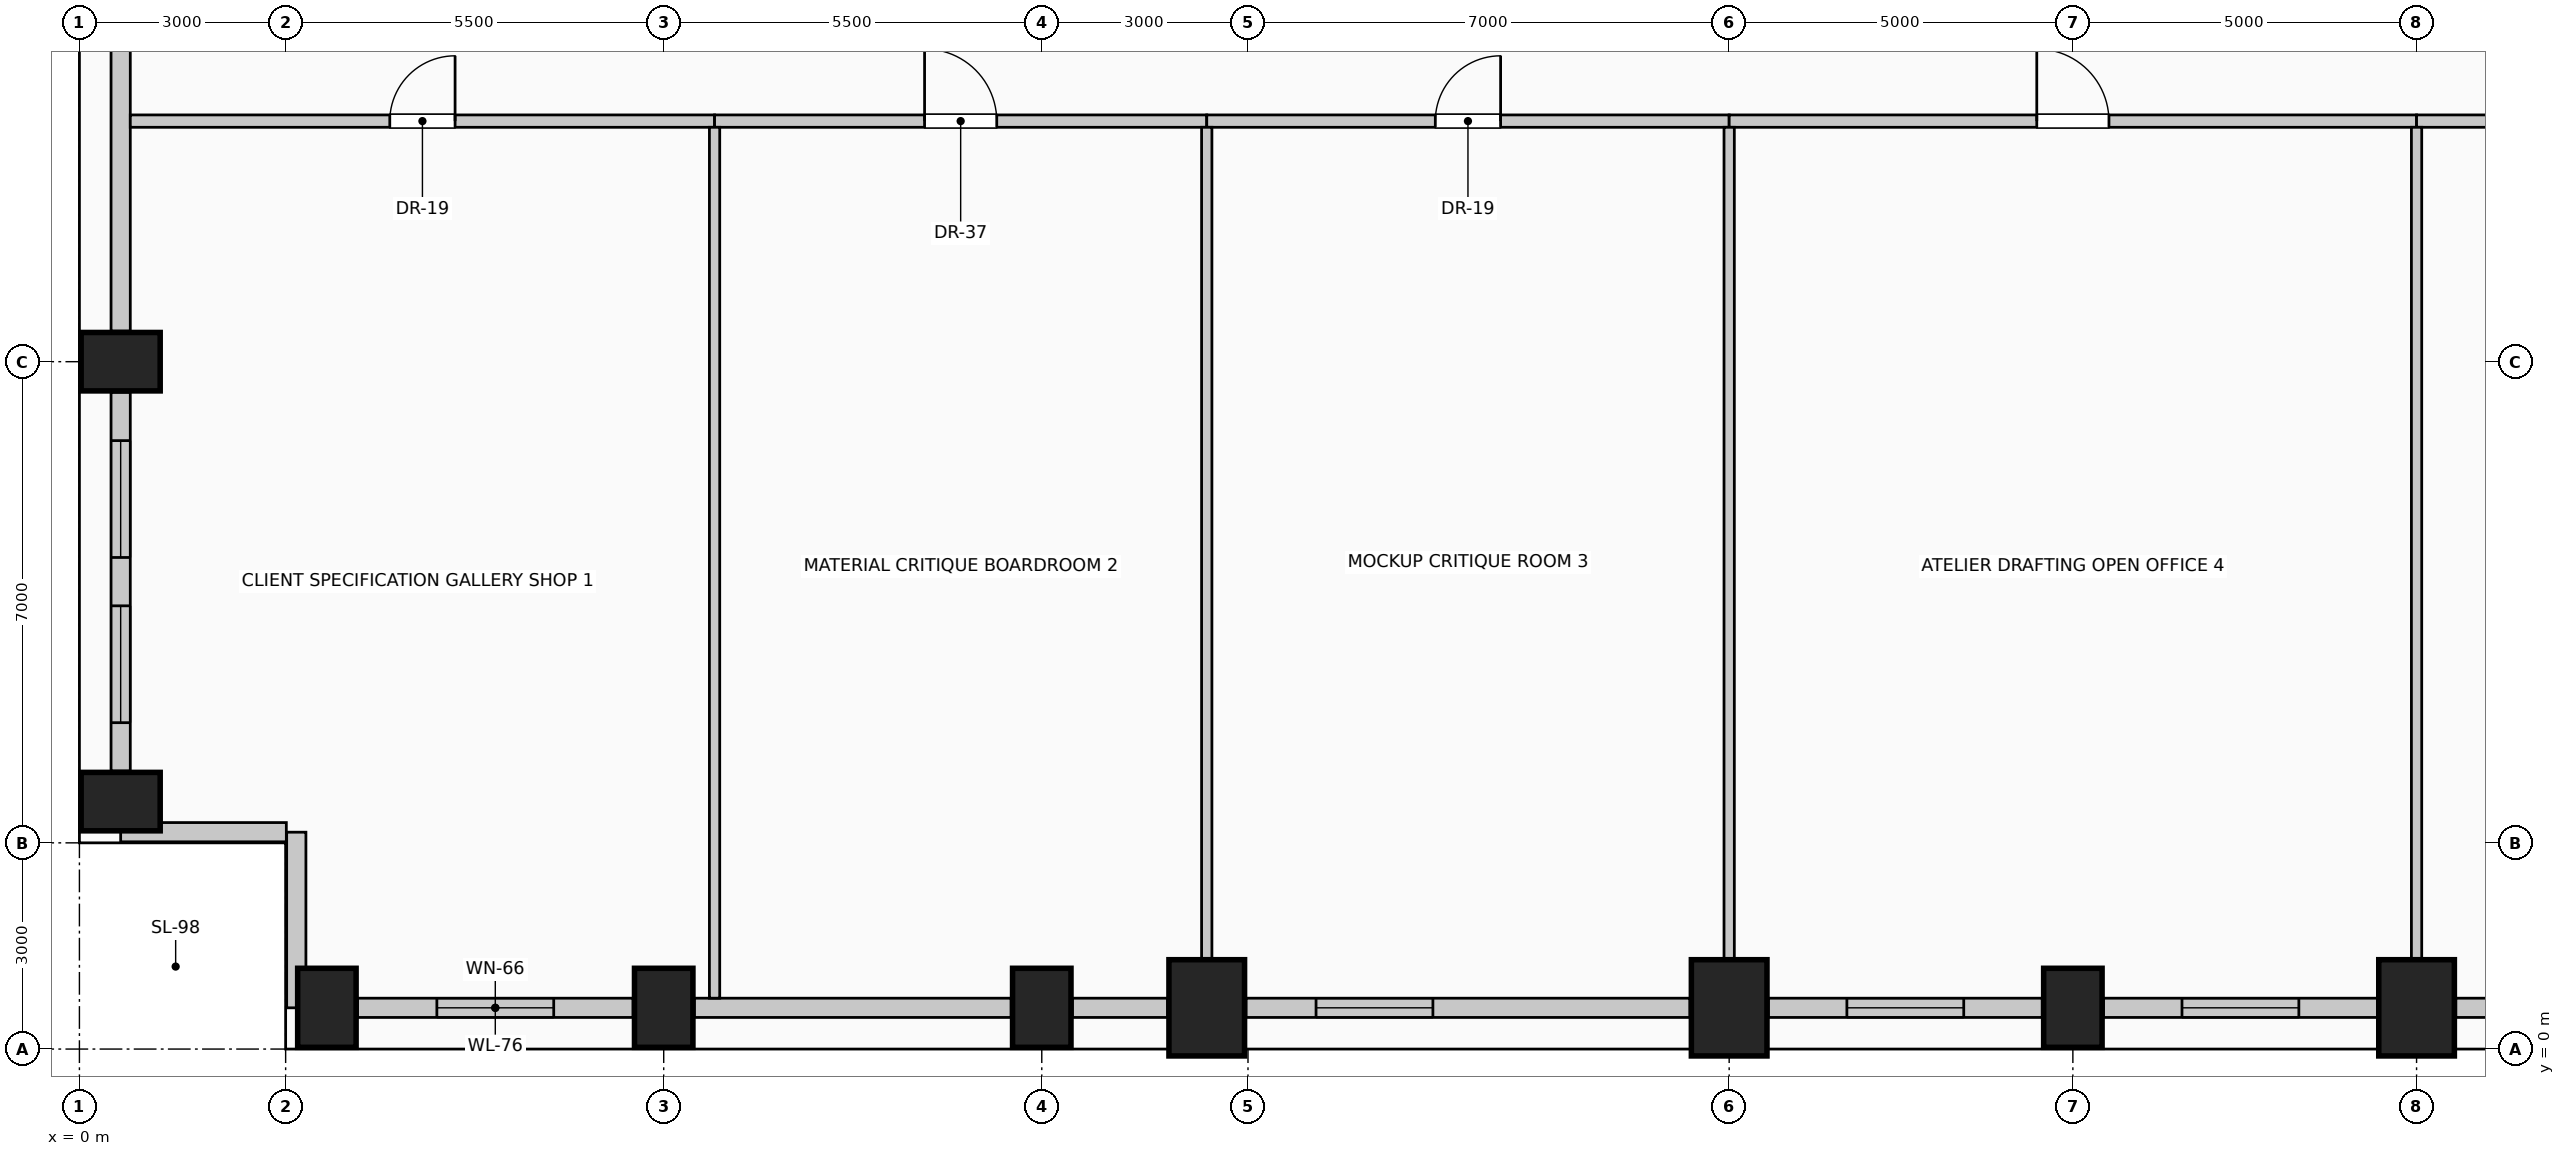
"""IFC4 building model, lengths in metres.
Left out: names, types, materials, properties, quantities, classifications, styles, units other than length and angle.
Written with IfcOpenShell. Run it as: python <this file> out.ifc"""

import sys

from ifc_helpers import new_model, si_unit, direction, frame, frame_2d, origin, origin_2d, place, context, subcontext, project, spatial, rectangle, extrude, element, fill, save


model = new_model("IFC4")
c1 = context("Model", 3, precision=1e-05, world=origin(), true_north=direction((0.0, 1.0)))
c2 = subcontext(c1, "Body", "Model", "MODEL_VIEW")
j1 = project(units=[si_unit("LENGTHUNIT", "METRE"), si_unit("PLANEANGLEUNIT", "RADIAN")], contexts=[c1])
p1 = place(None, origin())
s1 = spatial("IfcSite", under=j1, at=p1, CompositionType="ELEMENT")
p2 = place(p1, origin())
s2 = spatial("IfcBuilding", under=s1, at=p2, CompositionType="ELEMENT")
p3 = place(p2, frame((0.0, 0.0, 136.6)))
s3 = spatial("IfcBuildingStorey", under=s2, at=p3, CompositionType="ELEMENT", Elevation=136.6)
for number, where, z_axis, x_axis in (
    (1, (3.6, 0.6, 0.0), (0.0, 0.0, 1.0), (1.0, 0.0, 0.0)),
    (2, (8.5, 0.6, 0.0), (0.0, 0.0, 1.0), (1.0, 0.0, 0.0)),
    (3, (14.0, 0.6, 0.0), (0.0, 0.0, 1.0), (1.0, 0.0, 0.0)),
):
    element("IfcColumn", number, at=place(p3, frame(where, z_axis=z_axis, x_axis=x_axis)), inside=s3, PredefinedType="COLUMN", context=c2, shape_type="SweptSolid", body=[
        extrude(rectangle(XDim=0.85, YDim=1.15, at=origin_2d()), origin(), (0.0, 0.0, 1.0), 4.0),
    ])
for number, where, z_axis, x_axis in (
    (4, (16.4, 0.6, 0.0), (0.0, 0.0, 1.0), (1.0, 0.0, 0.0)),
    (5, (24.0, 0.6, 0.0), (0.0, 0.0, 1.0), (1.0, 0.0, 0.0)),
):
    element("IfcColumn", number, at=place(p3, frame(where, z_axis=z_axis, x_axis=x_axis)), inside=s3, PredefinedType="COLUMN", context=c2, shape_type="SweptSolid", body=[
        extrude(rectangle(XDim=1.1, YDim=1.4, at=origin_2d()), origin(), (0.0, 0.0, 1.0), 4.0),
    ])
p4 = place(p3, frame((29.0, 0.6, 0.0), z_axis=(0.0, 0.0, 1.0), x_axis=(1.0, 0.0, 0.0)))
e6 = element("IfcColumn", 6, at=p4, inside=s3, PredefinedType="COLUMN", context=c2, shape_type="SweptSolid", body=[
    extrude(rectangle(XDim=0.85, YDim=1.15, at=origin_2d()), origin(), (0.0, 0.0, 1.0), 4.0),
])
p5 = place(p3, frame((34.0, 0.6, 0.0), z_axis=(0.0, 0.0, 1.0), x_axis=(1.0, 0.0, 0.0)))
e7 = element("IfcColumn", 7, at=p5, inside=s3, PredefinedType="COLUMN", context=c2, shape_type="SweptSolid", body=[
    extrude(rectangle(XDim=1.1, YDim=1.4, at=origin_2d()), origin(), (0.0, 0.0, 1.0), 4.0),
])
for number, where, z_axis, x_axis in (
    (8, (0.6, 3.6, 0.0), (0.0, 0.0, 1.0), (0.0, 1.0, 0.0)),
    (9, (0.6, 10.0, 0.0), (0.0, 0.0, 1.0), (0.0, 1.0, 0.0)),
):
    element("IfcColumn", number, at=place(p3, frame(where, z_axis=z_axis, x_axis=x_axis)), inside=s3, PredefinedType="COLUMN", context=c2, shape_type="SweptSolid", body=[
        extrude(rectangle(XDim=0.85, YDim=1.15, at=origin_2d()), origin(), (0.0, 0.0, 1.0), 4.0),
    ])
p6 = place(p3, frame((8.055, 0.6, 0.0), z_axis=(0.0, 0.0, 1.0), x_axis=(-1.0, 0.0, 0.0)))
e10 = element("IfcWall", 10, at=p6, inside=s3, PredefinedType="SOLIDWALL", context=c2, shape_type="SweptSolid", body=[
    extrude(rectangle(XDim=4.01, YDim=0.28, at=frame_2d((2.005, 0.0))), origin(), (0.0, 0.0, 1.0), 2.875),
])
p7 = place(p6, frame((1.155, 0.0, 0.5)))
e11 = element("IfcOpeningElement", 11, at=p7, cuts=e10, PredefinedType="OPENING", context=c2, shape_type="SweptSolid", body=[
    extrude(rectangle(XDim=1.7, YDim=1.95, at=frame_2d((0.85, 0.975))), frame((0.0, 0.15, 0.0), z_axis=(0.0, -1.0, 0.0), x_axis=(1.0, 0.0, 0.0)), (0.0, 0.0, 1.0), 0.3),
])
p8 = place(p3, frame((13.555, 0.6, 0.0), z_axis=(0.0, 0.0, 1.0), x_axis=(-1.0, 0.0, 0.0)))
e12 = element("IfcWall", 12, at=p8, inside=s3, PredefinedType="SOLIDWALL", context=c2, shape_type="SweptSolid", body=[
    extrude(rectangle(XDim=4.61, YDim=0.28, at=frame_2d((2.305, 0.0))), origin(), (0.0, 0.0, 1.0), 2.875),
])
p9 = place(p3, frame((15.83, 0.6, 0.0), z_axis=(0.0, 0.0, 1.0), x_axis=(-1.0, 0.0, 0.0)))
e13 = element("IfcWall", 13, at=p9, inside=s3, PredefinedType="SOLIDWALL", context=c2, shape_type="SweptSolid", body=[
    extrude(rectangle(XDim=1.385, YDim=0.28, at=frame_2d((0.692, 0.0))), origin(), (0.0, 0.0, 1.0), 2.875),
])
p10 = place(p3, frame((23.43, 0.6, 0.0), z_axis=(0.0, 0.0, 1.0), x_axis=(-1.0, 0.0, 0.0)))
e14 = element("IfcWall", 14, at=p10, inside=s3, PredefinedType="SOLIDWALL", context=c2, shape_type="SweptSolid", body=[
    extrude(rectangle(XDim=6.46, YDim=0.28, at=frame_2d((3.23, 0.0))), origin(), (0.0, 0.0, 1.0), 2.875),
])
p11 = place(p10, frame((3.74, 0.0, 0.5)))
e15 = element("IfcOpeningElement", 15, at=p11, cuts=e14, PredefinedType="OPENING", context=c2, shape_type="SweptSolid", body=[
    extrude(rectangle(XDim=1.7, YDim=1.95, at=frame_2d((0.85, 0.975))), frame((0.0, 0.15, 0.0), z_axis=(0.0, -1.0, 0.0), x_axis=(1.0, 0.0, 0.0)), (0.0, 0.0, 1.0), 0.3),
])
p12 = place(p3, frame((28.555, 0.6, 0.0), z_axis=(0.0, 0.0, 1.0), x_axis=(-1.0, 0.0, 0.0)))
e16 = element("IfcWall", 16, at=p12, inside=s3, PredefinedType="SOLIDWALL", context=c2, shape_type="SweptSolid", body=[
    extrude(rectangle(XDim=3.985, YDim=0.28, at=frame_2d((1.992, 0.0))), origin(), (0.0, 0.0, 1.0), 2.875),
])
p13 = place(p12, frame((1.143, 0.0, 0.5)))
e17 = element("IfcOpeningElement", 17, at=p13, cuts=e16, PredefinedType="OPENING", context=c2, shape_type="SweptSolid", body=[
    extrude(rectangle(XDim=1.7, YDim=1.95, at=frame_2d((0.85, 0.975))), frame((0.0, 0.15, 0.0), z_axis=(0.0, -1.0, 0.0), x_axis=(1.0, 0.0, 0.0)), (0.0, 0.0, 1.0), 0.3),
])
p14 = place(p3, frame((33.43, 0.6, 0.0), z_axis=(0.0, 0.0, 1.0), x_axis=(-1.0, 0.0, 0.0)))
e18 = element("IfcWall", 18, at=p14, inside=s3, PredefinedType="SOLIDWALL", context=c2, shape_type="SweptSolid", body=[
    extrude(rectangle(XDim=3.985, YDim=0.28, at=frame_2d((1.992, 0.0))), origin(), (0.0, 0.0, 1.0), 2.875),
])
p15 = place(p14, frame((1.143, 0.0, 0.5)))
e19 = element("IfcOpeningElement", 19, at=p15, cuts=e18, PredefinedType="OPENING", context=c2, shape_type="SweptSolid", body=[
    extrude(rectangle(XDim=1.7, YDim=1.95, at=frame_2d((0.85, 0.975))), frame((0.0, 0.15, 0.0), z_axis=(0.0, -1.0, 0.0), x_axis=(1.0, 0.0, 0.0)), (0.0, 0.0, 1.0), 0.3),
])
p16 = place(p3, frame((41.03, 0.6, 0.0), z_axis=(0.0, 0.0, 1.0), x_axis=(-1.0, 0.0, 0.0)))
e20 = element("IfcWall", 20, at=p16, inside=s3, PredefinedType="SOLIDWALL", context=c2, shape_type="SweptSolid", body=[
    extrude(rectangle(XDim=6.46, YDim=0.28, at=frame_2d((3.23, 0.0))), origin(), (0.0, 0.0, 1.0), 2.875),
])
p17 = place(p16, frame((1.02, 0.0, 0.5)))
e21 = element("IfcOpeningElement", 21, at=p17, cuts=e20, PredefinedType="OPENING", context=c2, shape_type="SweptSolid", body=[
    extrude(rectangle(XDim=1.7, YDim=1.95, at=frame_2d((0.85, 0.975))), frame((0.0, 0.15, 0.0), z_axis=(0.0, -1.0, 0.0), x_axis=(1.0, 0.0, 0.0)), (0.0, 0.0, 1.0), 0.3),
])
p18 = place(p16, frame((3.74, 0.0, 0.5)))
e22 = element("IfcOpeningElement", 22, at=p18, cuts=e20, PredefinedType="OPENING", context=c2, shape_type="SweptSolid", body=[
    extrude(rectangle(XDim=1.7, YDim=1.95, at=frame_2d((0.85, 0.975))), frame((0.0, 0.15, 0.0), z_axis=(0.0, -1.0, 0.0), x_axis=(1.0, 0.0, 0.0)), (0.0, 0.0, 1.0), 0.3),
])
p19 = place(p3, frame((0.6, 4.045, 0.0), z_axis=(0.0, 0.0, 1.0), x_axis=(0.0, 1.0, 0.0)))
e23 = element("IfcWall", 23, at=p19, inside=s3, PredefinedType="SOLIDWALL", context=c2, shape_type="SweptSolid", body=[
    extrude(rectangle(XDim=5.51, YDim=0.28, at=frame_2d((2.755, 0.0))), origin(), (0.0, 0.0, 1.0), 2.875),
])
p20 = place(p19, frame((0.703, 0.0, 0.5)))
e24 = element("IfcOpeningElement", 24, at=p20, cuts=e23, PredefinedType="OPENING", context=c2, shape_type="SweptSolid", body=[
    extrude(rectangle(XDim=1.7, YDim=1.95, at=frame_2d((0.85, 0.975))), frame((0.0, 0.15, 0.0), z_axis=(0.0, -1.0, 0.0), x_axis=(1.0, 0.0, 0.0)), (0.0, 0.0, 1.0), 0.3),
])
p21 = place(p19, frame((3.107, 0.0, 0.5)))
e25 = element("IfcOpeningElement", 25, at=p21, cuts=e23, PredefinedType="OPENING", context=c2, shape_type="SweptSolid", body=[
    extrude(rectangle(XDim=1.7, YDim=1.95, at=frame_2d((0.85, 0.975))), frame((0.0, 0.15, 0.0), z_axis=(0.0, -1.0, 0.0), x_axis=(1.0, 0.0, 0.0)), (0.0, 0.0, 1.0), 0.3),
])
p22 = place(p3, frame((0.6, 10.445, 0.0), z_axis=(0.0, 0.0, 1.0), x_axis=(0.0, 1.0, 0.0)))
e26 = element("IfcWall", 26, at=p22, inside=s3, PredefinedType="SOLIDWALL", context=c2, shape_type="SweptSolid", body=[
    extrude(rectangle(XDim=7.11, YDim=0.28, at=frame_2d((3.555, 0.0))), origin(), (0.0, 0.0, 1.0), 2.875),
])
p23 = place(p3, frame((3.155, 0.6, 0.0), z_axis=(0.0, 0.0, 1.0), x_axis=(0.0, 1.0, 0.0)))
e27 = element("IfcWall", 27, at=p23, inside=s3, PredefinedType="SOLIDWALL", context=c2, shape_type="SweptSolid", body=[
    extrude(rectangle(XDim=2.555, YDim=0.28, at=frame_2d((1.277, 0.0))), origin(), (0.0, 0.0, 1.0), 3.725),
])
p24 = place(p3, frame((3.01, 3.155, 0.0), z_axis=(0.0, 0.0, 1.0), x_axis=(-1.0, 0.0, 0.0)))
e28 = element("IfcWall", 28, at=p24, inside=s3, PredefinedType="SOLIDWALL", context=c2, shape_type="SweptSolid", body=[
    extrude(rectangle(XDim=2.41, YDim=0.28, at=frame_2d((1.205, 0.0))), origin(), (0.0, 0.0, 1.0), 3.725),
])
p25 = place(p3, frame((0.74, 13.5, 0.0), z_axis=(0.0, 0.0, 1.0), x_axis=(1.0, 0.0, 0.0)))
e29 = element("IfcWall", 29, at=p25, inside=s3, PredefinedType="PARTITIONING", context=c2, shape_type="SweptSolid", body=[
    extrude(rectangle(XDim=8.5, YDim=0.18, at=frame_2d((4.25, 0.0))), origin(), (0.0, 0.0, 1.0), 3.725),
])
p26 = place(p25, frame((3.775, 0.0, 0.0)))
e30 = element("IfcOpeningElement", 30, at=p26, cuts=e29, PredefinedType="OPENING", context=c2, shape_type="SweptSolid", body=[
    extrude(rectangle(XDim=0.95, YDim=2.15, at=frame_2d((0.475, 1.075))), frame((0.0, 0.1, 0.0), z_axis=(0.0, -1.0, 0.0), x_axis=(1.0, 0.0, 0.0)), (0.0, 0.0, 1.0), 0.2),
])
p27 = place(p3, frame((9.24, 13.5, 0.0), z_axis=(0.0, 0.0, 1.0), x_axis=(1.0, 0.0, 0.0)))
e31 = element("IfcWall", 31, at=p27, inside=s3, PredefinedType="PARTITIONING", context=c2, shape_type="SweptSolid", body=[
    extrude(rectangle(XDim=7.16, YDim=0.18, at=frame_2d((3.58, 0.0))), origin(), (0.0, 0.0, 1.0), 3.725),
])
p28 = place(p27, frame((3.055, 0.0, 0.0)))
e32 = element("IfcOpeningElement", 32, at=p28, cuts=e31, PredefinedType="OPENING", context=c2, shape_type="SweptSolid", body=[
    extrude(rectangle(XDim=1.05, YDim=2.15, at=frame_2d((0.525, 1.075))), frame((0.0, 0.1, 0.0), z_axis=(0.0, -1.0, 0.0), x_axis=(1.0, 0.0, 0.0)), (0.0, 0.0, 1.0), 0.2),
])
p29 = place(p3, frame((16.4, 13.5, 0.0), z_axis=(0.0, 0.0, 1.0), x_axis=(1.0, 0.0, 0.0)))
e33 = element("IfcWall", 33, at=p29, inside=s3, PredefinedType="PARTITIONING", context=c2, shape_type="SweptSolid", body=[
    extrude(rectangle(XDim=7.6, YDim=0.18, at=frame_2d((3.8, 0.0))), origin(), (0.0, 0.0, 1.0), 3.725),
])
p30 = place(p29, frame((3.325, 0.0, 0.0)))
e34 = element("IfcOpeningElement", 34, at=p30, cuts=e33, PredefinedType="OPENING", context=c2, shape_type="SweptSolid", body=[
    extrude(rectangle(XDim=0.95, YDim=2.15, at=frame_2d((0.475, 1.075))), frame((0.0, 0.1, 0.0), z_axis=(0.0, -1.0, 0.0), x_axis=(1.0, 0.0, 0.0)), (0.0, 0.0, 1.0), 0.2),
])
p31 = place(p3, frame((24.0, 13.5, 0.0), z_axis=(0.0, 0.0, 1.0), x_axis=(1.0, 0.0, 0.0)))
e35 = element("IfcWall", 35, at=p31, inside=s3, PredefinedType="PARTITIONING", context=c2, shape_type="SweptSolid", body=[
    extrude(rectangle(XDim=10.0, YDim=0.18, at=frame_2d((5.0, 0.0))), origin(), (0.0, 0.0, 1.0), 3.725),
])
p32 = place(p31, frame((4.475, 0.0, 0.0)))
e36 = element("IfcOpeningElement", 36, at=p32, cuts=e35, PredefinedType="OPENING", context=c2, shape_type="SweptSolid", body=[
    extrude(rectangle(XDim=1.05, YDim=2.15, at=frame_2d((0.525, 1.075))), frame((0.0, 0.1, 0.0), z_axis=(0.0, -1.0, 0.0), x_axis=(1.0, 0.0, 0.0)), (0.0, 0.0, 1.0), 0.2),
])
p33 = place(p3, frame((34.0, 13.5, 0.0), z_axis=(0.0, 0.0, 1.0), x_axis=(1.0, 0.0, 0.0)))
e37 = element("IfcWall", 37, at=p33, inside=s3, PredefinedType="PARTITIONING", context=c2, shape_type="SweptSolid", body=[
    extrude(rectangle(XDim=10.0, YDim=0.18, at=frame_2d((5.0, 0.0))), origin(), (0.0, 0.0, 1.0), 3.725),
])
p34 = place(p33, frame((4.525, 0.0, 0.0)))
e38 = element("IfcOpeningElement", 38, at=p34, cuts=e37, PredefinedType="OPENING", context=c2, shape_type="SweptSolid", body=[
    extrude(rectangle(XDim=0.95, YDim=2.15, at=frame_2d((0.475, 1.075))), frame((0.0, 0.1, 0.0), z_axis=(0.0, -1.0, 0.0), x_axis=(1.0, 0.0, 0.0)), (0.0, 0.0, 1.0), 0.2),
])
p35 = place(p3, frame((9.24, 0.74, 0.0), z_axis=(0.0, 0.0, 1.0), x_axis=(0.0, 1.0, 0.0)))
e39 = element("IfcWall", 39, at=p35, inside=s3, PredefinedType="PARTITIONING", context=c2, shape_type="SweptSolid", body=[
    extrude(rectangle(XDim=12.67, YDim=0.15, at=frame_2d((6.335, 0.0))), origin(), (0.0, 0.0, 1.0), 3.725),
])
p36 = place(p3, frame((16.4, 1.3, 0.0), z_axis=(0.0, 0.0, 1.0), x_axis=(0.0, 1.0, 0.0)))
e40 = element("IfcWall", 40, at=p36, inside=s3, PredefinedType="PARTITIONING", context=c2, shape_type="SweptSolid", body=[
    extrude(rectangle(XDim=12.11, YDim=0.15, at=frame_2d((6.055, 0.0))), origin(), (0.0, 0.0, 1.0), 3.07),
])
for number, where, z_axis, x_axis in (
    (41, (24.0, 1.3, 0.0), (0.0, 0.0, 1.0), (0.0, 1.0, 0.0)),
    (42, (34.0, 1.3, 0.0), (0.0, 0.0, 1.0), (0.0, 1.0, 0.0)),
):
    element("IfcWall", number, at=place(p3, frame(where, z_axis=z_axis, x_axis=x_axis)), inside=s3, PredefinedType="PARTITIONING", context=c2, shape_type="SweptSolid", body=[
        extrude(rectangle(XDim=12.11, YDim=0.15, at=frame_2d((6.055, 0.0))), origin(), (0.0, 0.0, 1.0), 3.725),
    ])
p37 = place(p7, origin())
e43 = element("IfcWindow", 43, at=p37, inside=s3, PartitioningType="SINGLE_PANEL", PredefinedType="WINDOW", context=c2, shape_type="SweptSolid", body=[
    extrude(rectangle(XDim=1.7, YDim=1.95, at=frame_2d((0.85, 0.975))), frame((0.0, 0.03, 0.0), z_axis=(0.0, -1.0, 0.0), x_axis=(1.0, 0.0, 0.0)), (0.0, 0.0, 1.0), 0.06),
])
fill(e11, e43)
p38 = place(p11, origin())
e44 = element("IfcWindow", 44, at=p38, inside=s3, PartitioningType="SINGLE_PANEL", PredefinedType="WINDOW", context=c2, shape_type="SweptSolid", body=[
    extrude(rectangle(XDim=1.7, YDim=1.95, at=frame_2d((0.85, 0.975))), frame((0.0, 0.03, 0.0), z_axis=(0.0, -1.0, 0.0), x_axis=(1.0, 0.0, 0.0)), (0.0, 0.0, 1.0), 0.06),
])
fill(e15, e44)
p39 = place(p13, origin())
e45 = element("IfcWindow", 45, at=p39, inside=s3, PartitioningType="SINGLE_PANEL", PredefinedType="WINDOW", context=c2, shape_type="SweptSolid", body=[
    extrude(rectangle(XDim=1.7, YDim=1.95, at=frame_2d((0.85, 0.975))), frame((0.0, 0.03, 0.0), z_axis=(0.0, -1.0, 0.0), x_axis=(1.0, 0.0, 0.0)), (0.0, 0.0, 1.0), 0.06),
])
fill(e17, e45)
p40 = place(p15, origin())
e46 = element("IfcWindow", 46, at=p40, inside=s3, PartitioningType="SINGLE_PANEL", PredefinedType="WINDOW", context=c2, shape_type="SweptSolid", body=[
    extrude(rectangle(XDim=1.7, YDim=1.95, at=frame_2d((0.85, 0.975))), frame((0.0, 0.03, 0.0), z_axis=(0.0, -1.0, 0.0), x_axis=(1.0, 0.0, 0.0)), (0.0, 0.0, 1.0), 0.06),
])
fill(e19, e46)
p41 = place(p20, origin())
e47 = element("IfcWindow", 47, at=p41, inside=s3, PartitioningType="SINGLE_PANEL", PredefinedType="WINDOW", context=c2, shape_type="SweptSolid", body=[
    extrude(rectangle(XDim=1.7, YDim=1.95, at=frame_2d((0.85, 0.975))), frame((0.0, 0.03, 0.0), z_axis=(0.0, -1.0, 0.0), x_axis=(1.0, 0.0, 0.0)), (0.0, 0.0, 1.0), 0.06),
])
fill(e24, e47)
p42 = place(p21, origin())
e48 = element("IfcWindow", 48, at=p42, inside=s3, PartitioningType="SINGLE_PANEL", PredefinedType="WINDOW", context=c2, shape_type="SweptSolid", body=[
    extrude(rectangle(XDim=1.7, YDim=1.95, at=frame_2d((0.85, 0.975))), frame((0.0, 0.03, 0.0), z_axis=(0.0, -1.0, 0.0), x_axis=(1.0, 0.0, 0.0)), (0.0, 0.0, 1.0), 0.06),
])
fill(e25, e48)
p43 = place(p26, origin())
e49 = element("IfcDoor", 49, at=p43, inside=s3, OperationType="SINGLE_SWING_RIGHT", PredefinedType="DOOR", context=c2, shape_type="SweptSolid", body=[
    extrude(rectangle(XDim=0.95, YDim=2.15, at=frame_2d((0.475, 1.075))), frame((0.0, 0.025, 0.0), z_axis=(0.0, -1.0, 0.0), x_axis=(1.0, 0.0, 0.0)), (0.0, 0.0, 1.0), 0.05),
])
fill(e30, e49)
p44 = place(p28, origin())
e50 = element("IfcDoor", 50, at=p44, inside=s3, OperationType="SINGLE_SWING_LEFT", PredefinedType="DOOR", context=c2, shape_type="SweptSolid", body=[
    extrude(rectangle(XDim=1.05, YDim=2.15, at=frame_2d((0.525, 1.075))), frame((0.0, 0.025, 0.0), z_axis=(0.0, -1.0, 0.0), x_axis=(1.0, 0.0, 0.0)), (0.0, 0.0, 1.0), 0.05),
])
fill(e32, e50)
p45 = place(p30, origin())
e51 = element("IfcDoor", 51, at=p45, inside=s3, OperationType="SINGLE_SWING_RIGHT", PredefinedType="DOOR", context=c2, shape_type="SweptSolid", body=[
    extrude(rectangle(XDim=0.95, YDim=2.15, at=frame_2d((0.475, 1.075))), frame((0.0, 0.025, 0.0), z_axis=(0.0, -1.0, 0.0), x_axis=(1.0, 0.0, 0.0)), (0.0, 0.0, 1.0), 0.05),
])
fill(e34, e51)
p46 = place(p32, origin())
e52 = element("IfcDoor", 52, at=p46, inside=s3, OperationType="SINGLE_SWING_LEFT", PredefinedType="DOOR", context=c2, shape_type="SweptSolid", body=[
    extrude(rectangle(XDim=1.05, YDim=2.15, at=frame_2d((0.525, 1.075))), frame((0.0, 0.025, 0.0), z_axis=(0.0, -1.0, 0.0), x_axis=(1.0, 0.0, 0.0)), (0.0, 0.0, 1.0), 0.05),
])
fill(e36, e52)
save(model, sys.argv[1])
